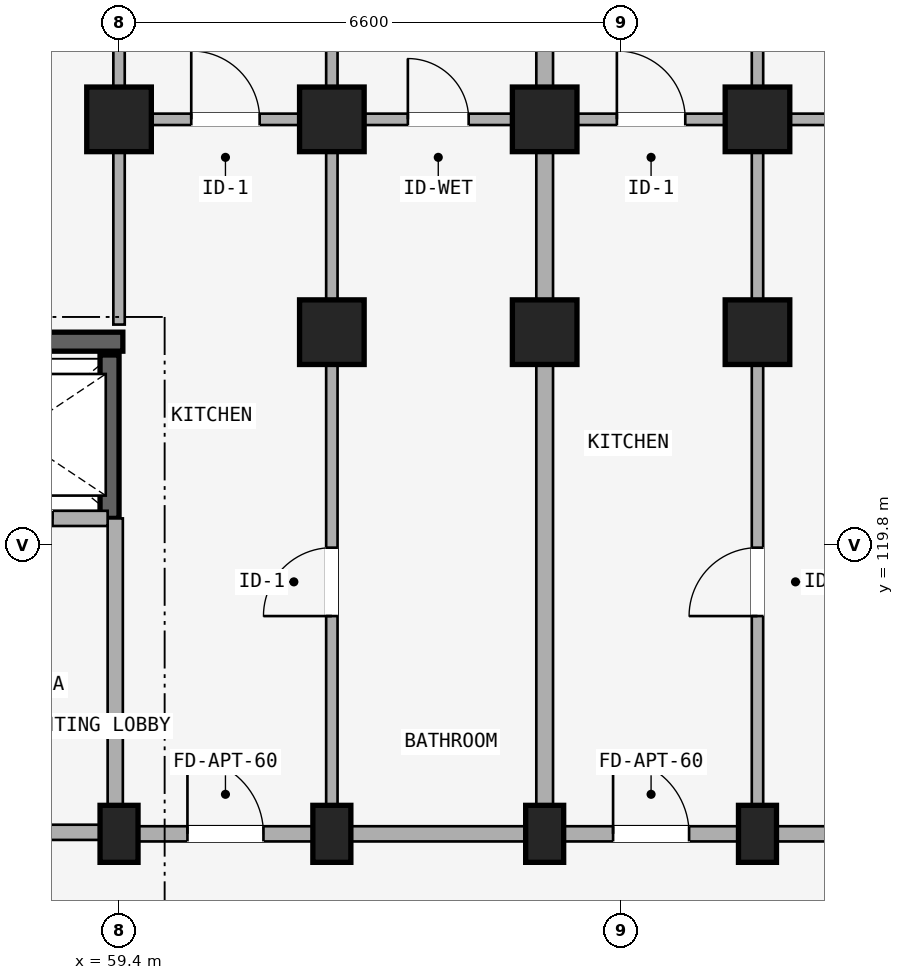
"""IFC4 building model, lengths in metres.
Left out: names, types, materials, properties, quantities, classifications, styles, units other than length and angle.
Written with IfcOpenShell. Run it as: python <this file> out.ifc"""

import sys

from ifc_helpers import new_model, si_unit, direction, frame, frame_2d, origin, origin_2d, place, context, subcontext, project, spatial, rectangle, extrude, element, fill, save


model = new_model("IFC4")
c1 = context("Model", 3, precision=1e-05, world=origin(), true_north=direction((0.0, 1.0)))
c2 = subcontext(c1, "Body", "Model", "MODEL_VIEW")
j1 = project(units=[si_unit("LENGTHUNIT", "METRE"), si_unit("PLANEANGLEUNIT", "RADIAN")], contexts=[c1])
p1 = place(None, origin())
s1 = spatial("IfcSite", under=j1, at=p1, CompositionType="ELEMENT")
p2 = place(p1, origin())
s2 = spatial("IfcBuilding", under=s1, at=p2, CompositionType="ELEMENT")
p3 = place(p2, frame((0.0, 0.0, 4.5)))
s3 = spatial("IfcBuildingStorey", under=s2, at=p3, CompositionType="ELEMENT", Elevation=4.5)
p4 = place(p3, frame((56.65, 122.475, 0.0), z_axis=(0.0, 0.0, 1.0), x_axis=(1.0, 0.0, 0.0)))
e1 = element("IfcWall", 1, at=p4, inside=s3, PredefinedType="SHEAR", context=c2, shape_type="SweptSolid", body=[
    extrude(rectangle(XDim=2.8, YDim=0.25, at=frame_2d((1.4, 0.0))), origin(), (0.0, 0.0, 1.0), 3.98),
])
p5 = place(p3, frame((59.275, 120.15, 0.0), z_axis=(0.0, 0.0, 1.0), x_axis=(0.0, 1.0, 0.0)))
e2 = element("IfcWall", 2, at=p5, inside=s3, PredefinedType="SHEAR", context=c2, shape_type="SweptSolid", body=[
    extrude(rectangle(XDim=2.15, YDim=0.25, at=frame_2d((1.075, 0.0))), origin(), (0.0, 0.0, 1.0), 3.98),
])
p6 = place(p3, frame((59.4, 116.0, 0.0), z_axis=(0.0, 0.0, 1.0), x_axis=(1.0, 0.0, 0.0)))
e3 = element("IfcColumn", 3, at=p6, inside=s3, PredefinedType="COLUMN", context=c2, shape_type="SweptSolid", body=[
    extrude(rectangle(XDim=0.5, YDim=0.75, at=origin_2d()), origin(), (0.0, 0.0, 1.0), 3.98),
])
p7 = place(p3, frame((59.4, 125.4, 0.0), z_axis=(0.0, 0.0, 1.0), x_axis=(1.0, 0.0, 0.0)))
e4 = element("IfcColumn", 4, at=p7, inside=s3, PredefinedType="COLUMN", context=c2, shape_type="SweptSolid", body=[
    extrude(rectangle(XDim=0.85, YDim=0.85, at=origin_2d()), origin(), (0.0, 0.0, 1.0), 3.98),
])
p8 = place(p3, frame((62.2, 116.0, 0.0), z_axis=(0.0, 0.0, 1.0), x_axis=(1.0, 0.0, 0.0)))
e5 = element("IfcColumn", 5, at=p8, inside=s3, PredefinedType="COLUMN", context=c2, shape_type="SweptSolid", body=[
    extrude(rectangle(XDim=0.5, YDim=0.75, at=origin_2d()), origin(), (0.0, 0.0, 1.0), 3.98),
])
for number, where, z_axis, x_axis in (
    (6, (62.2, 122.6, 0.0), (0.0, 0.0, 1.0), (1.0, 0.0, 0.0)),
    (7, (62.2, 125.4, 0.0), (0.0, 0.0, 1.0), (1.0, 0.0, 0.0)),
):
    element("IfcColumn", number, at=place(p3, frame(where, z_axis=z_axis, x_axis=x_axis)), inside=s3, PredefinedType="COLUMN", context=c2, shape_type="SweptSolid", body=[
        extrude(rectangle(XDim=0.85, YDim=0.85, at=origin_2d()), origin(), (0.0, 0.0, 1.0), 3.98),
    ])
p9 = place(p3, frame((65.0, 116.0, 0.0), z_axis=(0.0, 0.0, 1.0), x_axis=(1.0, 0.0, 0.0)))
e8 = element("IfcColumn", 8, at=p9, inside=s3, PredefinedType="COLUMN", context=c2, shape_type="SweptSolid", body=[
    extrude(rectangle(XDim=0.5, YDim=0.75, at=origin_2d()), origin(), (0.0, 0.0, 1.0), 3.98),
])
for number, where, z_axis, x_axis in (
    (9, (65.0, 122.6, 0.0), (0.0, 0.0, 1.0), (1.0, 0.0, 0.0)),
    (10, (65.0, 125.4, 0.0), (0.0, 0.0, 1.0), (1.0, 0.0, 0.0)),
):
    element("IfcColumn", number, at=place(p3, frame(where, z_axis=z_axis, x_axis=x_axis)), inside=s3, PredefinedType="COLUMN", context=c2, shape_type="SweptSolid", body=[
        extrude(rectangle(XDim=0.85, YDim=0.85, at=origin_2d()), origin(), (0.0, 0.0, 1.0), 3.98),
    ])
p10 = place(p3, frame((67.8, 116.0, 0.0), z_axis=(0.0, 0.0, 1.0), x_axis=(1.0, 0.0, 0.0)))
e11 = element("IfcColumn", 11, at=p10, inside=s3, PredefinedType="COLUMN", context=c2, shape_type="SweptSolid", body=[
    extrude(rectangle(XDim=0.5, YDim=0.75, at=origin_2d()), origin(), (0.0, 0.0, 1.0), 3.98),
])
for number, where, z_axis, x_axis in (
    (12, (67.8, 122.6, 0.0), (0.0, 0.0, 1.0), (1.0, 0.0, 0.0)),
    (13, (67.8, 125.4, 0.0), (0.0, 0.0, 1.0), (1.0, 0.0, 0.0)),
):
    element("IfcColumn", number, at=place(p3, frame(where, z_axis=z_axis, x_axis=x_axis)), inside=s3, PredefinedType="COLUMN", context=c2, shape_type="SweptSolid", body=[
        extrude(rectangle(XDim=0.85, YDim=0.85, at=origin_2d()), origin(), (0.0, 0.0, 1.0), 3.98),
    ])
p11 = place(p3, frame((53.7, 116.02, 0.0), z_axis=(0.0, 0.0, 1.0), x_axis=(1.0, 0.0, 0.0)))
e14 = element("IfcWall", 14, at=p11, inside=s3, PredefinedType="STANDARD", context=c2, shape_type="SweptSolid", body=[
    extrude(rectangle(XDim=5.65, YDim=0.2, at=frame_2d((2.825, 0.0))), origin(), (0.0, 0.0, 1.0), 3.322),
])
p12 = place(p11, frame((1.923, 0.0, 0.0)))
e15 = element("IfcOpeningElement", 15, at=p12, cuts=e14, PredefinedType="OPENING", context=c2, shape_type="SweptSolid", body=[
    extrude(rectangle(XDim=1.24, YDim=2.15, at=frame_2d((0.62, 1.075))), frame((0.0, 0.11, 0.0), z_axis=(0.0, -1.0, 0.0), x_axis=(1.0, 0.0, 0.0)), (0.0, 0.0, 1.0), 0.22),
])
p13 = place(p3, frame((59.35, 116.02, 0.0), z_axis=(0.0, 0.0, 1.0), x_axis=(0.0, 1.0, 0.0)))
e16 = element("IfcWall", 16, at=p13, inside=s3, PredefinedType="STANDARD", context=c2, shape_type="SweptSolid", body=[
    extrude(rectangle(XDim=4.13, YDim=0.2, at=frame_2d((2.065, 0.0))), origin(), (0.0, 0.0, 1.0), 3.322),
])
p14 = place(p3, frame((56.7, 120.15, 0.0), z_axis=(0.0, 0.0, 1.0), x_axis=(1.0, 0.0, 0.0)))
e17 = element("IfcWall", 17, at=p14, inside=s3, PredefinedType="STANDARD", context=c2, shape_type="SweptSolid", body=[
    extrude(rectangle(XDim=2.55, YDim=0.2, at=frame_2d((1.275, 0.0))), origin(), (0.0, 0.0, 1.0), 3.322),
])
p15 = place(p14, frame((0.725, 0.0, 0.0)))
e18 = element("IfcOpeningElement", 18, at=p15, cuts=e17, PredefinedType="OPENING", context=c2, shape_type="SweptSolid", body=[
    extrude(rectangle(XDim=1.1, YDim=2.15, at=frame_2d((0.55, 1.075))), frame((0.0, 0.11, 0.0), z_axis=(0.0, -1.0, 0.0), x_axis=(1.0, 0.0, 0.0)), (0.0, 0.0, 1.0), 0.22),
])
p16 = place(p3, frame((59.4, 116.0, 0.0), z_axis=(0.0, 0.0, 1.0), x_axis=(1.0, 0.0, 0.0)))
e19 = element("IfcWall", 19, at=p16, inside=s3, PredefinedType="STANDARD", context=c2, shape_type="SweptSolid", body=[
    extrude(rectangle(XDim=2.8, YDim=0.2, at=frame_2d((1.4, 0.0))), origin(), (0.0, 0.0, 1.0), 3.322),
])
p17 = place(p16, frame((0.9, 0.0, 0.0)))
e20 = element("IfcOpeningElement", 20, at=p17, cuts=e19, PredefinedType="OPENING", context=c2, shape_type="SweptSolid", body=[
    extrude(rectangle(XDim=1.0, YDim=2.15, at=frame_2d((0.5, 1.075))), frame((0.0, 0.11, 0.0), z_axis=(0.0, -1.0, 0.0), x_axis=(1.0, 0.0, 0.0)), (0.0, 0.0, 1.0), 0.22),
])
p18 = place(p3, frame((59.48, 125.4, 0.0), z_axis=(0.0, 0.0, 1.0), x_axis=(1.0, 0.0, 0.0)))
e21 = element("IfcWall", 21, at=p18, inside=s3, PredefinedType="PLUMBINGWALL", context=c2, shape_type="SweptSolid", body=[
    extrude(rectangle(XDim=2.64, YDim=0.15, at=frame_2d((1.32, 0.0))), origin(), (0.0, 0.0, 1.0), 3.322),
])
p19 = place(p18, frame((0.87, 0.0, 0.0)))
e22 = element("IfcOpeningElement", 22, at=p19, cuts=e21, PredefinedType="OPENING", context=c2, shape_type="SweptSolid", body=[
    extrude(rectangle(XDim=0.9, YDim=2.1, at=frame_2d((0.45, 1.05))), frame((0.0, 0.085, 0.0), z_axis=(0.0, -1.0, 0.0), x_axis=(1.0, 0.0, 0.0)), (0.0, 0.0, 1.0), 0.17),
])
p20 = place(p3, frame((62.2, 116.0, 0.0), z_axis=(0.0, 0.0, 1.0), x_axis=(1.0, 0.0, 0.0)))
e23 = element("IfcWall", 23, at=p20, inside=s3, PredefinedType="STANDARD", context=c2, shape_type="SweptSolid", body=[
    extrude(rectangle(XDim=2.8, YDim=0.2, at=frame_2d((1.4, 0.0))), origin(), (0.0, 0.0, 1.0), 3.322),
])
p21 = place(p3, frame((62.28, 125.4, 0.0), z_axis=(0.0, 0.0, 1.0), x_axis=(1.0, 0.0, 0.0)))
e24 = element("IfcWall", 24, at=p21, inside=s3, PredefinedType="PLUMBINGWALL", context=c2, shape_type="SweptSolid", body=[
    extrude(rectangle(XDim=2.64, YDim=0.15, at=frame_2d((1.32, 0.0))), origin(), (0.0, 0.0, 1.0), 3.322),
])
p22 = place(p21, frame((0.92, 0.0, 0.0)))
e25 = element("IfcOpeningElement", 25, at=p22, cuts=e24, PredefinedType="OPENING", context=c2, shape_type="SweptSolid", body=[
    extrude(rectangle(XDim=0.8, YDim=2.1, at=frame_2d((0.4, 1.05))), frame((0.0, 0.085, 0.0), z_axis=(0.0, -1.0, 0.0), x_axis=(1.0, 0.0, 0.0)), (0.0, 0.0, 1.0), 0.17),
])
p23 = place(p3, frame((65.0, 116.0, 0.0), z_axis=(0.0, 0.0, 1.0), x_axis=(1.0, 0.0, 0.0)))
e26 = element("IfcWall", 26, at=p23, inside=s3, PredefinedType="STANDARD", context=c2, shape_type="SweptSolid", body=[
    extrude(rectangle(XDim=2.8, YDim=0.2, at=frame_2d((1.4, 0.0))), origin(), (0.0, 0.0, 1.0), 3.322),
])
p24 = place(p23, frame((0.9, 0.0, 0.0)))
e27 = element("IfcOpeningElement", 27, at=p24, cuts=e26, PredefinedType="OPENING", context=c2, shape_type="SweptSolid", body=[
    extrude(rectangle(XDim=1.0, YDim=2.15, at=frame_2d((0.5, 1.075))), frame((0.0, 0.11, 0.0), z_axis=(0.0, -1.0, 0.0), x_axis=(1.0, 0.0, 0.0)), (0.0, 0.0, 1.0), 0.22),
])
p25 = place(p3, frame((65.08, 125.4, 0.0), z_axis=(0.0, 0.0, 1.0), x_axis=(1.0, 0.0, 0.0)))
e28 = element("IfcWall", 28, at=p25, inside=s3, PredefinedType="PLUMBINGWALL", context=c2, shape_type="SweptSolid", body=[
    extrude(rectangle(XDim=2.64, YDim=0.15, at=frame_2d((1.32, 0.0))), origin(), (0.0, 0.0, 1.0), 3.322),
])
p26 = place(p25, frame((0.87, 0.0, 0.0)))
e29 = element("IfcOpeningElement", 29, at=p26, cuts=e28, PredefinedType="OPENING", context=c2, shape_type="SweptSolid", body=[
    extrude(rectangle(XDim=0.9, YDim=2.1, at=frame_2d((0.45, 1.05))), frame((0.0, 0.085, 0.0), z_axis=(0.0, -1.0, 0.0), x_axis=(1.0, 0.0, 0.0)), (0.0, 0.0, 1.0), 0.17),
])
p27 = place(p3, frame((67.8, 116.0, 0.0), z_axis=(0.0, 0.0, 1.0), x_axis=(1.0, 0.0, 0.0)))
e30 = element("IfcWall", 30, at=p27, inside=s3, PredefinedType="STANDARD", context=c2, shape_type="SweptSolid", body=[
    extrude(rectangle(XDim=2.8, YDim=0.2, at=frame_2d((1.4, 0.0))), origin(), (0.0, 0.0, 1.0), 3.322),
])
p28 = place(p3, frame((67.88, 125.4, 0.0), z_axis=(0.0, 0.0, 1.0), x_axis=(1.0, 0.0, 0.0)))
e31 = element("IfcWall", 31, at=p28, inside=s3, PredefinedType="PLUMBINGWALL", context=c2, shape_type="SweptSolid", body=[
    extrude(rectangle(XDim=2.64, YDim=0.15, at=frame_2d((1.32, 0.0))), origin(), (0.0, 0.0, 1.0), 3.322),
])
p29 = place(p28, frame((0.92, 0.0, 0.0)))
e32 = element("IfcOpeningElement", 32, at=p29, cuts=e31, PredefinedType="OPENING", context=c2, shape_type="SweptSolid", body=[
    extrude(rectangle(XDim=0.8, YDim=2.1, at=frame_2d((0.4, 1.05))), frame((0.0, 0.085, 0.0), z_axis=(0.0, -1.0, 0.0), x_axis=(1.0, 0.0, 0.0)), (0.0, 0.0, 1.0), 0.17),
])
p30 = place(p3, frame((59.4, 122.7, 0.0), z_axis=(0.0, 0.0, 1.0), x_axis=(0.0, 1.0, 0.0)))
e33 = element("IfcWall", 33, at=p30, inside=s3, PredefinedType="PARTITIONING", context=c2, shape_type="SweptSolid", body=[
    extrude(rectangle(XDim=10.82, YDim=0.15, at=frame_2d((5.41, 0.0))), origin(), (0.0, 0.0, 1.0), 3.322),
])
p31 = place(p30, frame((3.7, 0.0, 0.0)))
e34 = element("IfcOpeningElement", 34, at=p31, cuts=e33, PredefinedType="OPENING", context=c2, shape_type="SweptSolid", body=[
    extrude(rectangle(XDim=0.8, YDim=2.1, at=frame_2d((0.4, 1.05))), frame((0.0, 0.085, 0.0), z_axis=(0.0, -1.0, 0.0), x_axis=(1.0, 0.0, 0.0)), (0.0, 0.0, 1.0), 0.17),
])
p32 = place(p3, frame((62.2, 116.05, 0.0), z_axis=(0.0, 0.0, 1.0), x_axis=(0.0, 1.0, 0.0)))
e35 = element("IfcWall", 35, at=p32, inside=s3, PredefinedType="PARTITIONING", context=c2, shape_type="SweptSolid", body=[
    extrude(rectangle(XDim=6.53, YDim=0.15, at=frame_2d((3.265, 0.0))), origin(), (0.0, 0.0, 1.0), 3.322),
])
p33 = place(p32, frame((2.815, 0.0, 0.0)))
e36 = element("IfcOpeningElement", 36, at=p33, cuts=e35, PredefinedType="OPENING", context=c2, shape_type="SweptSolid", body=[
    extrude(rectangle(XDim=0.9, YDim=2.1, at=frame_2d((0.45, 1.05))), frame((0.0, 0.085, 0.0), z_axis=(0.0, -1.0, 0.0), x_axis=(1.0, 0.0, 0.0)), (0.0, 0.0, 1.0), 0.17),
])
p34 = place(p3, frame((62.2, 122.7, 0.0), z_axis=(0.0, 0.0, 1.0), x_axis=(0.0, 1.0, 0.0)))
e37 = element("IfcWall", 37, at=p34, inside=s3, PredefinedType="PARTITIONING", context=c2, shape_type="SweptSolid", body=[
    extrude(rectangle(XDim=10.82, YDim=0.15, at=frame_2d((5.41, 0.0))), origin(), (0.0, 0.0, 1.0), 3.322),
])
p35 = place(p34, frame((3.7, 0.0, 0.0)))
e38 = element("IfcOpeningElement", 38, at=p35, cuts=e37, PredefinedType="OPENING", context=c2, shape_type="SweptSolid", body=[
    extrude(rectangle(XDim=0.8, YDim=2.1, at=frame_2d((0.4, 1.05))), frame((0.0, 0.085, 0.0), z_axis=(0.0, -1.0, 0.0), x_axis=(1.0, 0.0, 0.0)), (0.0, 0.0, 1.0), 0.17),
])
p36 = place(p3, frame((65.0, 116.05, 0.0), z_axis=(0.0, 0.0, 1.0), x_axis=(0.0, 1.0, 0.0)))
e39 = element("IfcWall", 39, at=p36, inside=s3, PredefinedType="STANDARD", context=c2, shape_type="SweptSolid", body=[
    extrude(rectangle(XDim=6.53, YDim=0.22, at=frame_2d((3.265, 0.0))), origin(), (0.0, 0.0, 1.0), 3.322),
])
p37 = place(p3, frame((65.0, 122.7, 0.0), z_axis=(0.0, 0.0, 1.0), x_axis=(0.0, 1.0, 0.0)))
e40 = element("IfcWall", 40, at=p37, inside=s3, PredefinedType="STANDARD", context=c2, shape_type="SweptSolid", body=[
    extrude(rectangle(XDim=10.82, YDim=0.22, at=frame_2d((5.41, 0.0))), origin(), (0.0, 0.0, 1.0), 3.322),
])
p38 = place(p3, frame((67.8, 116.05, 0.0), z_axis=(0.0, 0.0, 1.0), x_axis=(0.0, 1.0, 0.0)))
e41 = element("IfcWall", 41, at=p38, inside=s3, PredefinedType="PARTITIONING", context=c2, shape_type="SweptSolid", body=[
    extrude(rectangle(XDim=6.53, YDim=0.15, at=frame_2d((3.265, 0.0))), origin(), (0.0, 0.0, 1.0), 3.322),
])
p39 = place(p38, frame((2.815, 0.0, 0.0)))
e42 = element("IfcOpeningElement", 42, at=p39, cuts=e41, PredefinedType="OPENING", context=c2, shape_type="SweptSolid", body=[
    extrude(rectangle(XDim=0.9, YDim=2.1, at=frame_2d((0.45, 1.05))), frame((0.0, 0.085, 0.0), z_axis=(0.0, -1.0, 0.0), x_axis=(1.0, 0.0, 0.0)), (0.0, 0.0, 1.0), 0.17),
])
p40 = place(p3, frame((67.8, 122.7, 0.0), z_axis=(0.0, 0.0, 1.0), x_axis=(0.0, 1.0, 0.0)))
e43 = element("IfcWall", 43, at=p40, inside=s3, PredefinedType="PARTITIONING", context=c2, shape_type="SweptSolid", body=[
    extrude(rectangle(XDim=10.82, YDim=0.15, at=frame_2d((5.41, 0.0))), origin(), (0.0, 0.0, 1.0), 3.322),
])
p41 = place(p40, frame((3.7, 0.0, 0.0)))
e44 = element("IfcOpeningElement", 44, at=p41, cuts=e43, PredefinedType="OPENING", context=c2, shape_type="SweptSolid", body=[
    extrude(rectangle(XDim=0.8, YDim=2.1, at=frame_2d((0.4, 1.05))), frame((0.0, 0.085, 0.0), z_axis=(0.0, -1.0, 0.0), x_axis=(1.0, 0.0, 0.0)), (0.0, 0.0, 1.0), 0.17),
])
p42 = place(p15, origin())
e45 = element("IfcDoor", 45, at=p42, inside=s3, OperationType="SLIDING_TO_LEFT", PredefinedType="DOOR", context=c2, shape_type="SweptSolid", body=[
    extrude(rectangle(XDim=1.1, YDim=2.15, at=frame_2d((0.55, 1.075))), frame((0.0, 0.025, 0.0), z_axis=(0.0, -1.0, 0.0), x_axis=(1.0, 0.0, 0.0)), (0.0, 0.0, 1.0), 0.05),
])
fill(e18, e45)
p43 = place(p19, origin())
e46 = element("IfcDoor", 46, at=p43, inside=s3, OperationType="SINGLE_SWING_LEFT", PredefinedType="DOOR", context=c2, shape_type="SweptSolid", body=[
    extrude(rectangle(XDim=0.9, YDim=2.1, at=frame_2d((0.45, 1.05))), frame((0.0, 0.025, 0.0), z_axis=(0.0, -1.0, 0.0), x_axis=(1.0, 0.0, 0.0)), (0.0, 0.0, 1.0), 0.05),
])
fill(e22, e46)
p44 = place(p17, frame((1.0, 0.0, 0.0), z_axis=(0.0, 0.0, 1.0), x_axis=(-1.0, 0.0, 0.0)))
e47 = element("IfcDoor", 47, at=p44, inside=s3, OperationType="SINGLE_SWING_RIGHT", PredefinedType="DOOR", context=c2, shape_type="SweptSolid", body=[
    extrude(rectangle(XDim=1.0, YDim=2.15, at=frame_2d((0.5, 1.075))), frame((0.0, 0.025, 0.0), z_axis=(0.0, -1.0, 0.0), x_axis=(1.0, 0.0, 0.0)), (0.0, 0.0, 1.0), 0.05),
])
fill(e20, e47)
p45 = place(p22, origin())
e48 = element("IfcDoor", 48, at=p45, inside=s3, OperationType="SINGLE_SWING_LEFT", PredefinedType="DOOR", context=c2, shape_type="SweptSolid", body=[
    extrude(rectangle(XDim=0.8, YDim=2.1, at=frame_2d((0.4, 1.05))), frame((0.0, 0.025, 0.0), z_axis=(0.0, -1.0, 0.0), x_axis=(1.0, 0.0, 0.0)), (0.0, 0.0, 1.0), 0.05),
])
fill(e25, e48)
p46 = place(p26, origin())
e49 = element("IfcDoor", 49, at=p46, inside=s3, OperationType="SINGLE_SWING_LEFT", PredefinedType="DOOR", context=c2, shape_type="SweptSolid", body=[
    extrude(rectangle(XDim=0.9, YDim=2.1, at=frame_2d((0.45, 1.05))), frame((0.0, 0.025, 0.0), z_axis=(0.0, -1.0, 0.0), x_axis=(1.0, 0.0, 0.0)), (0.0, 0.0, 1.0), 0.05),
])
fill(e29, e49)
p47 = place(p24, frame((1.0, 0.0, 0.0), z_axis=(0.0, 0.0, 1.0), x_axis=(-1.0, 0.0, 0.0)))
e50 = element("IfcDoor", 50, at=p47, inside=s3, OperationType="SINGLE_SWING_RIGHT", PredefinedType="DOOR", context=c2, shape_type="SweptSolid", body=[
    extrude(rectangle(XDim=1.0, YDim=2.15, at=frame_2d((0.5, 1.075))), frame((0.0, 0.025, 0.0), z_axis=(0.0, -1.0, 0.0), x_axis=(1.0, 0.0, 0.0)), (0.0, 0.0, 1.0), 0.05),
])
fill(e27, e50)
p48 = place(p33, frame((0.9, 0.0, 0.0), z_axis=(0.0, 0.0, 1.0), x_axis=(-1.0, 0.0, 0.0)))
e51 = element("IfcDoor", 51, at=p48, inside=s3, OperationType="SINGLE_SWING_RIGHT", PredefinedType="DOOR", context=c2, shape_type="SweptSolid", body=[
    extrude(rectangle(XDim=0.9, YDim=2.1, at=frame_2d((0.45, 1.05))), frame((0.0, 0.025, 0.0), z_axis=(0.0, -1.0, 0.0), x_axis=(1.0, 0.0, 0.0)), (0.0, 0.0, 1.0), 0.05),
])
fill(e36, e51)
p49 = place(p39, origin())
e52 = element("IfcDoor", 52, at=p49, inside=s3, OperationType="SINGLE_SWING_LEFT", PredefinedType="DOOR", context=c2, shape_type="SweptSolid", body=[
    extrude(rectangle(XDim=0.9, YDim=2.1, at=frame_2d((0.45, 1.05))), frame((0.0, 0.025, 0.0), z_axis=(0.0, -1.0, 0.0), x_axis=(1.0, 0.0, 0.0)), (0.0, 0.0, 1.0), 0.05),
])
fill(e42, e52)
save(model, sys.argv[1])
